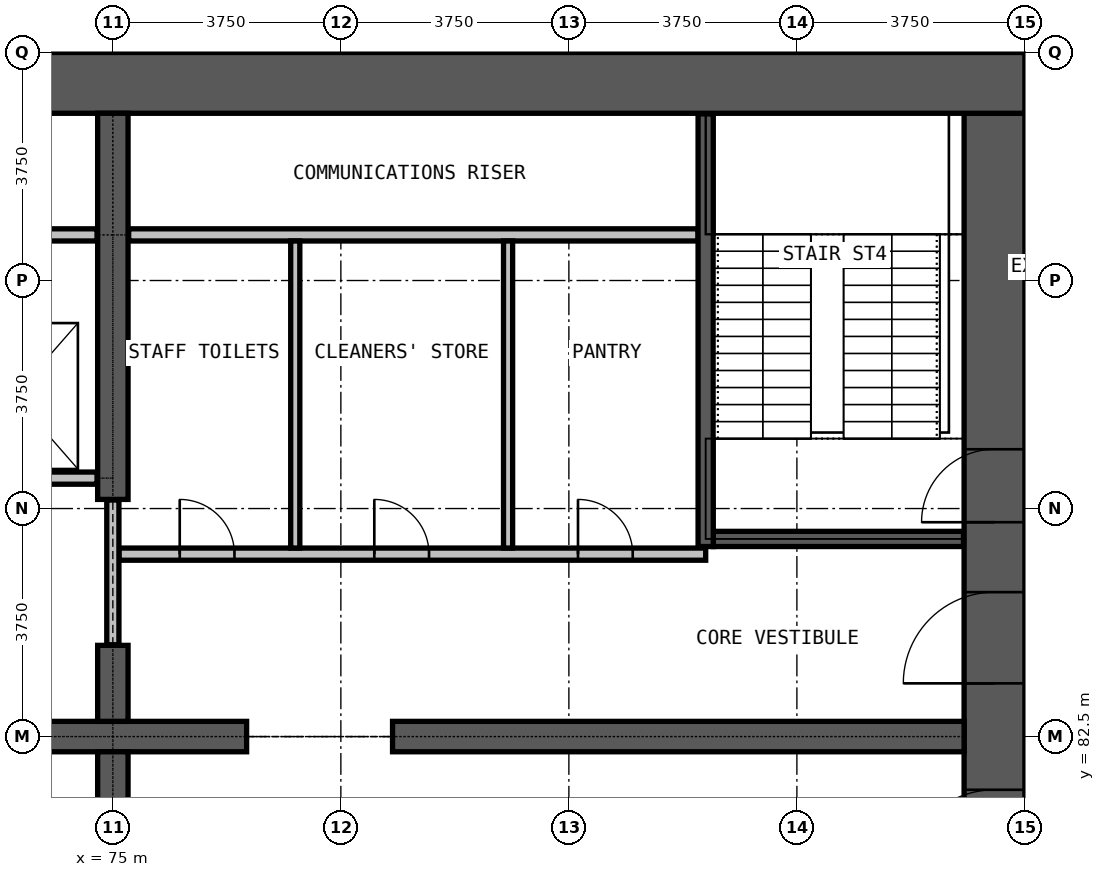
"""IFC4 building model, lengths in metres.
Left out: names, types, materials, properties, quantities, classifications, styles, units other than length and angle.
Written with IfcOpenShell. Run it as: python <this file> out.ifc"""

import sys

from ifc_helpers import new_model, si_unit, direction, frame, frame_2d, origin, place, context, subcontext, project, spatial, rectangle, extrude, element, fill, save


model = new_model("IFC4")
c1 = context("Model", 3, precision=1e-05, world=origin(), true_north=direction((0.0, 1.0)))
c2 = subcontext(c1, "Body", "Model", "MODEL_VIEW")
j1 = project(units=[si_unit("LENGTHUNIT", "METRE"), si_unit("PLANEANGLEUNIT", "RADIAN")], contexts=[c1])
p1 = place(None, origin())
s1 = spatial("IfcSite", under=j1, at=p1, CompositionType="ELEMENT")
p2 = place(p1, origin())
s2 = spatial("IfcBuilding", under=s1, at=p2, CompositionType="ELEMENT")
p3 = place(p2, frame((0.0, 0.0, 7.5)))
s3 = spatial("IfcBuildingStorey", under=s2, at=p3, CompositionType="ELEMENT", Elevation=7.5)
p4 = place(p3, frame((89.5, 72.25, 0.0), z_axis=(0.0, 0.0, 1.0), x_axis=(0.0, 1.0, 0.0)))
e1 = element("IfcWall", 1, at=p4, inside=s3, PredefinedType="SHEAR", context=c2, shape_type="SweptSolid", body=[
    extrude(rectangle(XDim=20.5, YDim=1.0, at=frame_2d((10.25, 0.0))), origin(), (0.0, 0.0, 1.0), 9.0),
])
p5 = place(p4, frame((0.275, 0.0, 0.0)))
e2 = element("IfcOpeningElement", 2, at=p5, cuts=e1, PredefinedType="OPENING", context=c2, shape_type="SweptSolid", body=[
    extrude(rectangle(XDim=1.2, YDim=2.2, at=frame_2d((0.6, 1.1))), frame((0.0, 0.51, 0.0), z_axis=(0.0, -1.0, 0.0), x_axis=(1.0, 0.0, 0.0)), (0.0, 0.0, 1.0), 1.02),
])
p6 = place(p4, frame((13.775, 0.0, 0.0)))
e3 = element("IfcOpeningElement", 3, at=p6, cuts=e1, PredefinedType="OPENING", context=c2, shape_type="SweptSolid", body=[
    extrude(rectangle(XDim=1.2, YDim=2.2, at=frame_2d((0.6, 1.1))), frame((0.0, 0.51, 0.0), z_axis=(0.0, -1.0, 0.0), x_axis=(1.0, 0.0, 0.0)), (0.0, 0.0, 1.0), 1.02),
])
p7 = place(p4, frame((7.875, 0.0, 0.0)))
e4 = element("IfcOpeningElement", 4, at=p7, cuts=e1, PredefinedType="OPENING", context=c2, shape_type="SweptSolid", body=[
    extrude(rectangle(XDim=1.5, YDim=2.2, at=frame_2d((0.75, 1.1))), frame((0.0, 0.51, 0.0), z_axis=(0.0, -1.0, 0.0), x_axis=(1.0, 0.0, 0.0)), (0.0, 0.0, 1.0), 1.02),
])
p8 = place(p4, frame((11.125, 0.0, 0.0)))
e5 = element("IfcOpeningElement", 5, at=p8, cuts=e1, PredefinedType="OPENING", context=c2, shape_type="SweptSolid", body=[
    extrude(rectangle(XDim=1.5, YDim=2.2, at=frame_2d((0.75, 1.1))), frame((0.0, 0.51, 0.0), z_axis=(0.0, -1.0, 0.0), x_axis=(1.0, 0.0, 0.0)), (0.0, 0.0, 1.0), 1.02),
])
p9 = place(p3, frame((90.0, 93.25, 0.0), z_axis=(0.0, 0.0, 1.0), x_axis=(-1.0, 0.0, 0.0)))
e6 = element("IfcWall", 6, at=p9, inside=s3, PredefinedType="SHEAR", context=c2, shape_type="SweptSolid", body=[
    extrude(rectangle(XDim=30.0, YDim=1.0, at=frame_2d((15.0, 0.0))), origin(), (0.0, 0.0, 1.0), 9.0),
])
p10 = place(p3, frame((72.8, 82.5, 0.0), z_axis=(0.0, 0.0, 1.0), x_axis=(1.0, 0.0, 0.0)))
e7 = element("IfcWall", 7, at=p10, inside=s3, PredefinedType="SHEAR", context=c2, shape_type="SweptSolid", body=[
    extrude(rectangle(XDim=4.4, YDim=0.5, at=frame_2d((2.2, 0.0))), origin(), (0.0, 0.0, 1.0), 9.0),
])
p11 = place(p3, frame((79.6, 82.5, 0.0), z_axis=(0.0, 0.0, 1.0), x_axis=(1.0, 0.0, 0.0)))
e8 = element("IfcWall", 8, at=p11, inside=s3, PredefinedType="SHEAR", context=c2, shape_type="SweptSolid", body=[
    extrude(rectangle(XDim=9.4, YDim=0.5, at=frame_2d((4.7, 0.0))), origin(), (0.0, 0.0, 1.0), 9.0),
])
for number, where, z_axis, x_axis in (
    (9, (75.0, 81.0, 0.0), (0.0, 0.0, 1.0), (0.0, 1.0, 0.0)),
    (10, (75.0, 82.75, 0.0), (0.0, 0.0, 1.0), (0.0, 1.0, 0.0)),
):
    element("IfcWall", number, at=place(p3, frame(where, z_axis=z_axis, x_axis=x_axis)), inside=s3, PredefinedType="SHEAR", context=c2, shape_type="SweptSolid", body=[
        extrude(rectangle(XDim=1.25, YDim=0.5, at=frame_2d((0.625, 0.0))), origin(), (0.0, 0.0, 1.0), 9.0),
    ])
p12 = place(p3, frame((75.0, 86.4, 0.0), z_axis=(0.0, 0.0, 1.0), x_axis=(0.0, 1.0, 0.0)))
e11 = element("IfcWall", 11, at=p12, inside=s3, PredefinedType="SHEAR", context=c2, shape_type="SweptSolid", body=[
    extrude(rectangle(XDim=6.35, YDim=0.5, at=frame_2d((3.175, 0.0))), origin(), (0.0, 0.0, 1.0), 9.0),
])
p13 = place(p3, frame((75.1, 85.5, 0.0), z_axis=(0.0, 0.0, 1.0), x_axis=(1.0, 0.0, 0.0)))
e12 = element("IfcWall", 12, at=p13, inside=s3, PredefinedType="PARTITIONING", context=c2, shape_type="SweptSolid", body=[
    extrude(rectangle(XDim=9.65, YDim=0.2, at=frame_2d((4.825, 0.0))), origin(), (0.0, 0.0, 1.0), 8.65),
])
p14 = place(p13, frame((1.0, 0.0, 0.0)))
e13 = element("IfcOpeningElement", 13, at=p14, cuts=e12, PredefinedType="OPENING", context=c2, shape_type="SweptSolid", body=[
    extrude(rectangle(XDim=0.9, YDim=2.2, at=frame_2d((0.45, 1.1))), frame((0.0, 0.11, 0.0), z_axis=(0.0, -1.0, 0.0), x_axis=(1.0, 0.0, 0.0)), (0.0, 0.0, 1.0), 0.22),
])
p15 = place(p13, frame((4.2, 0.0, 0.0)))
e14 = element("IfcOpeningElement", 14, at=p15, cuts=e12, PredefinedType="OPENING", context=c2, shape_type="SweptSolid", body=[
    extrude(rectangle(XDim=0.9, YDim=2.2, at=frame_2d((0.45, 1.1))), frame((0.0, 0.11, 0.0), z_axis=(0.0, -1.0, 0.0), x_axis=(1.0, 0.0, 0.0)), (0.0, 0.0, 1.0), 0.22),
])
p16 = place(p13, frame((7.55, 0.0, 0.0)))
e15 = element("IfcOpeningElement", 15, at=p16, cuts=e12, PredefinedType="OPENING", context=c2, shape_type="SweptSolid", body=[
    extrude(rectangle(XDim=0.9, YDim=2.2, at=frame_2d((0.45, 1.1))), frame((0.0, 0.11, 0.0), z_axis=(0.0, -1.0, 0.0), x_axis=(1.0, 0.0, 0.0)), (0.0, 0.0, 1.0), 0.22),
])
p17 = place(p3, frame((75.26, 90.75, 0.0), z_axis=(0.0, 0.0, 1.0), x_axis=(1.0, 0.0, 0.0)))
e16 = element("IfcWall", 16, at=p17, inside=s3, PredefinedType="PARTITIONING", context=c2, shape_type="SweptSolid", body=[
    extrude(rectangle(XDim=9.365, YDim=0.2, at=frame_2d((4.683, 0.0))), origin(), (0.0, 0.0, 1.0), 8.65),
])
p18 = place(p3, frame((75.0, 84.01, 0.0), z_axis=(0.0, 0.0, 1.0), x_axis=(0.0, 1.0, 0.0)))
e17 = element("IfcWall", 17, at=p18, inside=s3, PredefinedType="PARTITIONING", context=c2, shape_type="SweptSolid", body=[
    extrude(rectangle(XDim=2.38, YDim=0.2, at=frame_2d((1.19, 0.0))), origin(), (0.0, 0.0, 1.0), 2.4),
])
for number, where, z_axis, x_axis in (
    (18, (78.0, 85.6, 0.0), (0.0, 0.0, 1.0), (0.0, 1.0, 0.0)),
    (19, (81.5, 85.6, 0.0), (0.0, 0.0, 1.0), (0.0, 1.0, 0.0)),
):
    element("IfcWall", number, at=place(p3, frame(where, z_axis=z_axis, x_axis=x_axis)), inside=s3, PredefinedType="PARTITIONING", context=c2, shape_type="SweptSolid", body=[
        extrude(rectangle(XDim=5.05, YDim=0.15, at=frame_2d((2.525, 0.0))), origin(), (0.0, 0.0, 1.0), 8.65),
    ])
p19 = place(p3, frame((65.375, 86.75, 0.0), z_axis=(0.0, 0.0, 1.0), x_axis=(1.0, 0.0, 0.0)))
e20 = element("IfcWall", 20, at=p19, inside=s3, PredefinedType="PARTITIONING", context=c2, shape_type="SweptSolid", body=[
    extrude(rectangle(XDim=9.365, YDim=0.2, at=frame_2d((4.683, 0.0))), origin(), (0.0, 0.0, 1.0), 8.65),
])
p20 = place(p19, frame((1.0, 0.0, 0.0)))
e21 = element("IfcOpeningElement", 21, at=p20, cuts=e20, PredefinedType="OPENING", context=c2, shape_type="SweptSolid", body=[
    extrude(rectangle(XDim=1.1, YDim=2.2, at=frame_2d((0.55, 1.1))), frame((0.0, 0.11, 0.0), z_axis=(0.0, -1.0, 0.0), x_axis=(1.0, 0.0, 0.0)), (0.0, 0.0, 1.0), 0.22),
])
p21 = place(p19, frame((4.175, 0.0, 0.0)))
e22 = element("IfcOpeningElement", 22, at=p21, cuts=e20, PredefinedType="OPENING", context=c2, shape_type="SweptSolid", body=[
    extrude(rectangle(XDim=1.1, YDim=2.2, at=frame_2d((0.55, 1.1))), frame((0.0, 0.11, 0.0), z_axis=(0.0, -1.0, 0.0), x_axis=(1.0, 0.0, 0.0)), (0.0, 0.0, 1.0), 0.22),
])
p22 = place(p19, frame((7.325, 0.0, 0.0)))
e23 = element("IfcOpeningElement", 23, at=p22, cuts=e20, PredefinedType="OPENING", context=c2, shape_type="SweptSolid", body=[
    extrude(rectangle(XDim=1.1, YDim=2.2, at=frame_2d((0.55, 1.1))), frame((0.0, 0.11, 0.0), z_axis=(0.0, -1.0, 0.0), x_axis=(1.0, 0.0, 0.0)), (0.0, 0.0, 1.0), 0.22),
])
p23 = place(p3, frame((65.375, 90.75, 0.0), z_axis=(0.0, 0.0, 1.0), x_axis=(1.0, 0.0, 0.0)))
e24 = element("IfcWall", 24, at=p23, inside=s3, PredefinedType="PARTITIONING", context=c2, shape_type="SweptSolid", body=[
    extrude(rectangle(XDim=9.365, YDim=0.2, at=frame_2d((4.683, 0.0))), origin(), (0.0, 0.0, 1.0), 8.65),
])
p24 = place(p3, frame((84.875, 85.75, 0.0), z_axis=(0.0, 0.0, 1.0), x_axis=(1.0, 0.0, 0.0)))
e25 = element("IfcWall", 25, at=p24, inside=s3, PredefinedType="PARTITIONING", context=c2, shape_type="SweptSolid", body=[
    extrude(rectangle(XDim=4.115, YDim=0.25, at=frame_2d((2.058, 0.0))), origin(), (0.0, 0.0, 1.0), 8.65),
])
p25 = place(p3, frame((84.75, 85.625, 0.0), z_axis=(0.0, 0.0, 1.0), x_axis=(0.0, 1.0, 0.0)))
e26 = element("IfcWall", 26, at=p25, inside=s3, PredefinedType="PARTITIONING", context=c2, shape_type="SweptSolid", body=[
    extrude(rectangle(XDim=7.115, YDim=0.25, at=frame_2d((3.558, 0.0))), origin(), (0.0, 0.0, 1.0), 8.65),
])
p26 = place(p6, origin())
e27 = element("IfcDoor", 27, at=p26, inside=s3, OperationType="SINGLE_SWING_RIGHT", PredefinedType="DOOR", context=c2, shape_type="SweptSolid", body=[
    extrude(rectangle(XDim=1.2, YDim=2.2, at=frame_2d((0.6, 1.1))), frame((0.0, 0.025, 0.0), z_axis=(0.0, -1.0, 0.0), x_axis=(1.0, 0.0, 0.0)), (0.0, 0.0, 1.0), 0.05),
])
fill(e3, e27)
p27 = place(p7, origin())
e28 = element("IfcDoor", 28, at=p27, inside=s3, OperationType="DOUBLE_DOOR_SINGLE_SWING", PredefinedType="DOOR", context=c2, shape_type="SweptSolid", body=[
    extrude(rectangle(XDim=1.5, YDim=2.2, at=frame_2d((0.75, 1.1))), frame((0.0, 0.025, 0.0), z_axis=(0.0, -1.0, 0.0), x_axis=(1.0, 0.0, 0.0)), (0.0, 0.0, 1.0), 0.05),
])
fill(e4, e28)
p28 = place(p8, origin())
e29 = element("IfcDoor", 29, at=p28, inside=s3, OperationType="DOUBLE_DOOR_SINGLE_SWING", PredefinedType="DOOR", context=c2, shape_type="SweptSolid", body=[
    extrude(rectangle(XDim=1.5, YDim=2.2, at=frame_2d((0.75, 1.1))), frame((0.0, 0.025, 0.0), z_axis=(0.0, -1.0, 0.0), x_axis=(1.0, 0.0, 0.0)), (0.0, 0.0, 1.0), 0.05),
])
fill(e5, e29)
p29 = place(p14, origin())
e30 = element("IfcDoor", 30, at=p29, inside=s3, OperationType="SINGLE_SWING_RIGHT", PredefinedType="DOOR", context=c2, shape_type="SweptSolid", body=[
    extrude(rectangle(XDim=0.9, YDim=2.2, at=frame_2d((0.45, 1.1))), frame((0.0, 0.025, 0.0), z_axis=(0.0, -1.0, 0.0), x_axis=(1.0, 0.0, 0.0)), (0.0, 0.0, 1.0), 0.05),
])
fill(e13, e30)
p30 = place(p15, origin())
e31 = element("IfcDoor", 31, at=p30, inside=s3, OperationType="SINGLE_SWING_LEFT", PredefinedType="DOOR", context=c2, shape_type="SweptSolid", body=[
    extrude(rectangle(XDim=0.9, YDim=2.2, at=frame_2d((0.45, 1.1))), frame((0.0, 0.025, 0.0), z_axis=(0.0, -1.0, 0.0), x_axis=(1.0, 0.0, 0.0)), (0.0, 0.0, 1.0), 0.05),
])
fill(e14, e31)
p31 = place(p16, origin())
e32 = element("IfcDoor", 32, at=p31, inside=s3, OperationType="SINGLE_SWING_LEFT", PredefinedType="DOOR", context=c2, shape_type="SweptSolid", body=[
    extrude(rectangle(XDim=0.9, YDim=2.2, at=frame_2d((0.45, 1.1))), frame((0.0, 0.025, 0.0), z_axis=(0.0, -1.0, 0.0), x_axis=(1.0, 0.0, 0.0)), (0.0, 0.0, 1.0), 0.05),
])
fill(e15, e32)
save(model, sys.argv[1])
